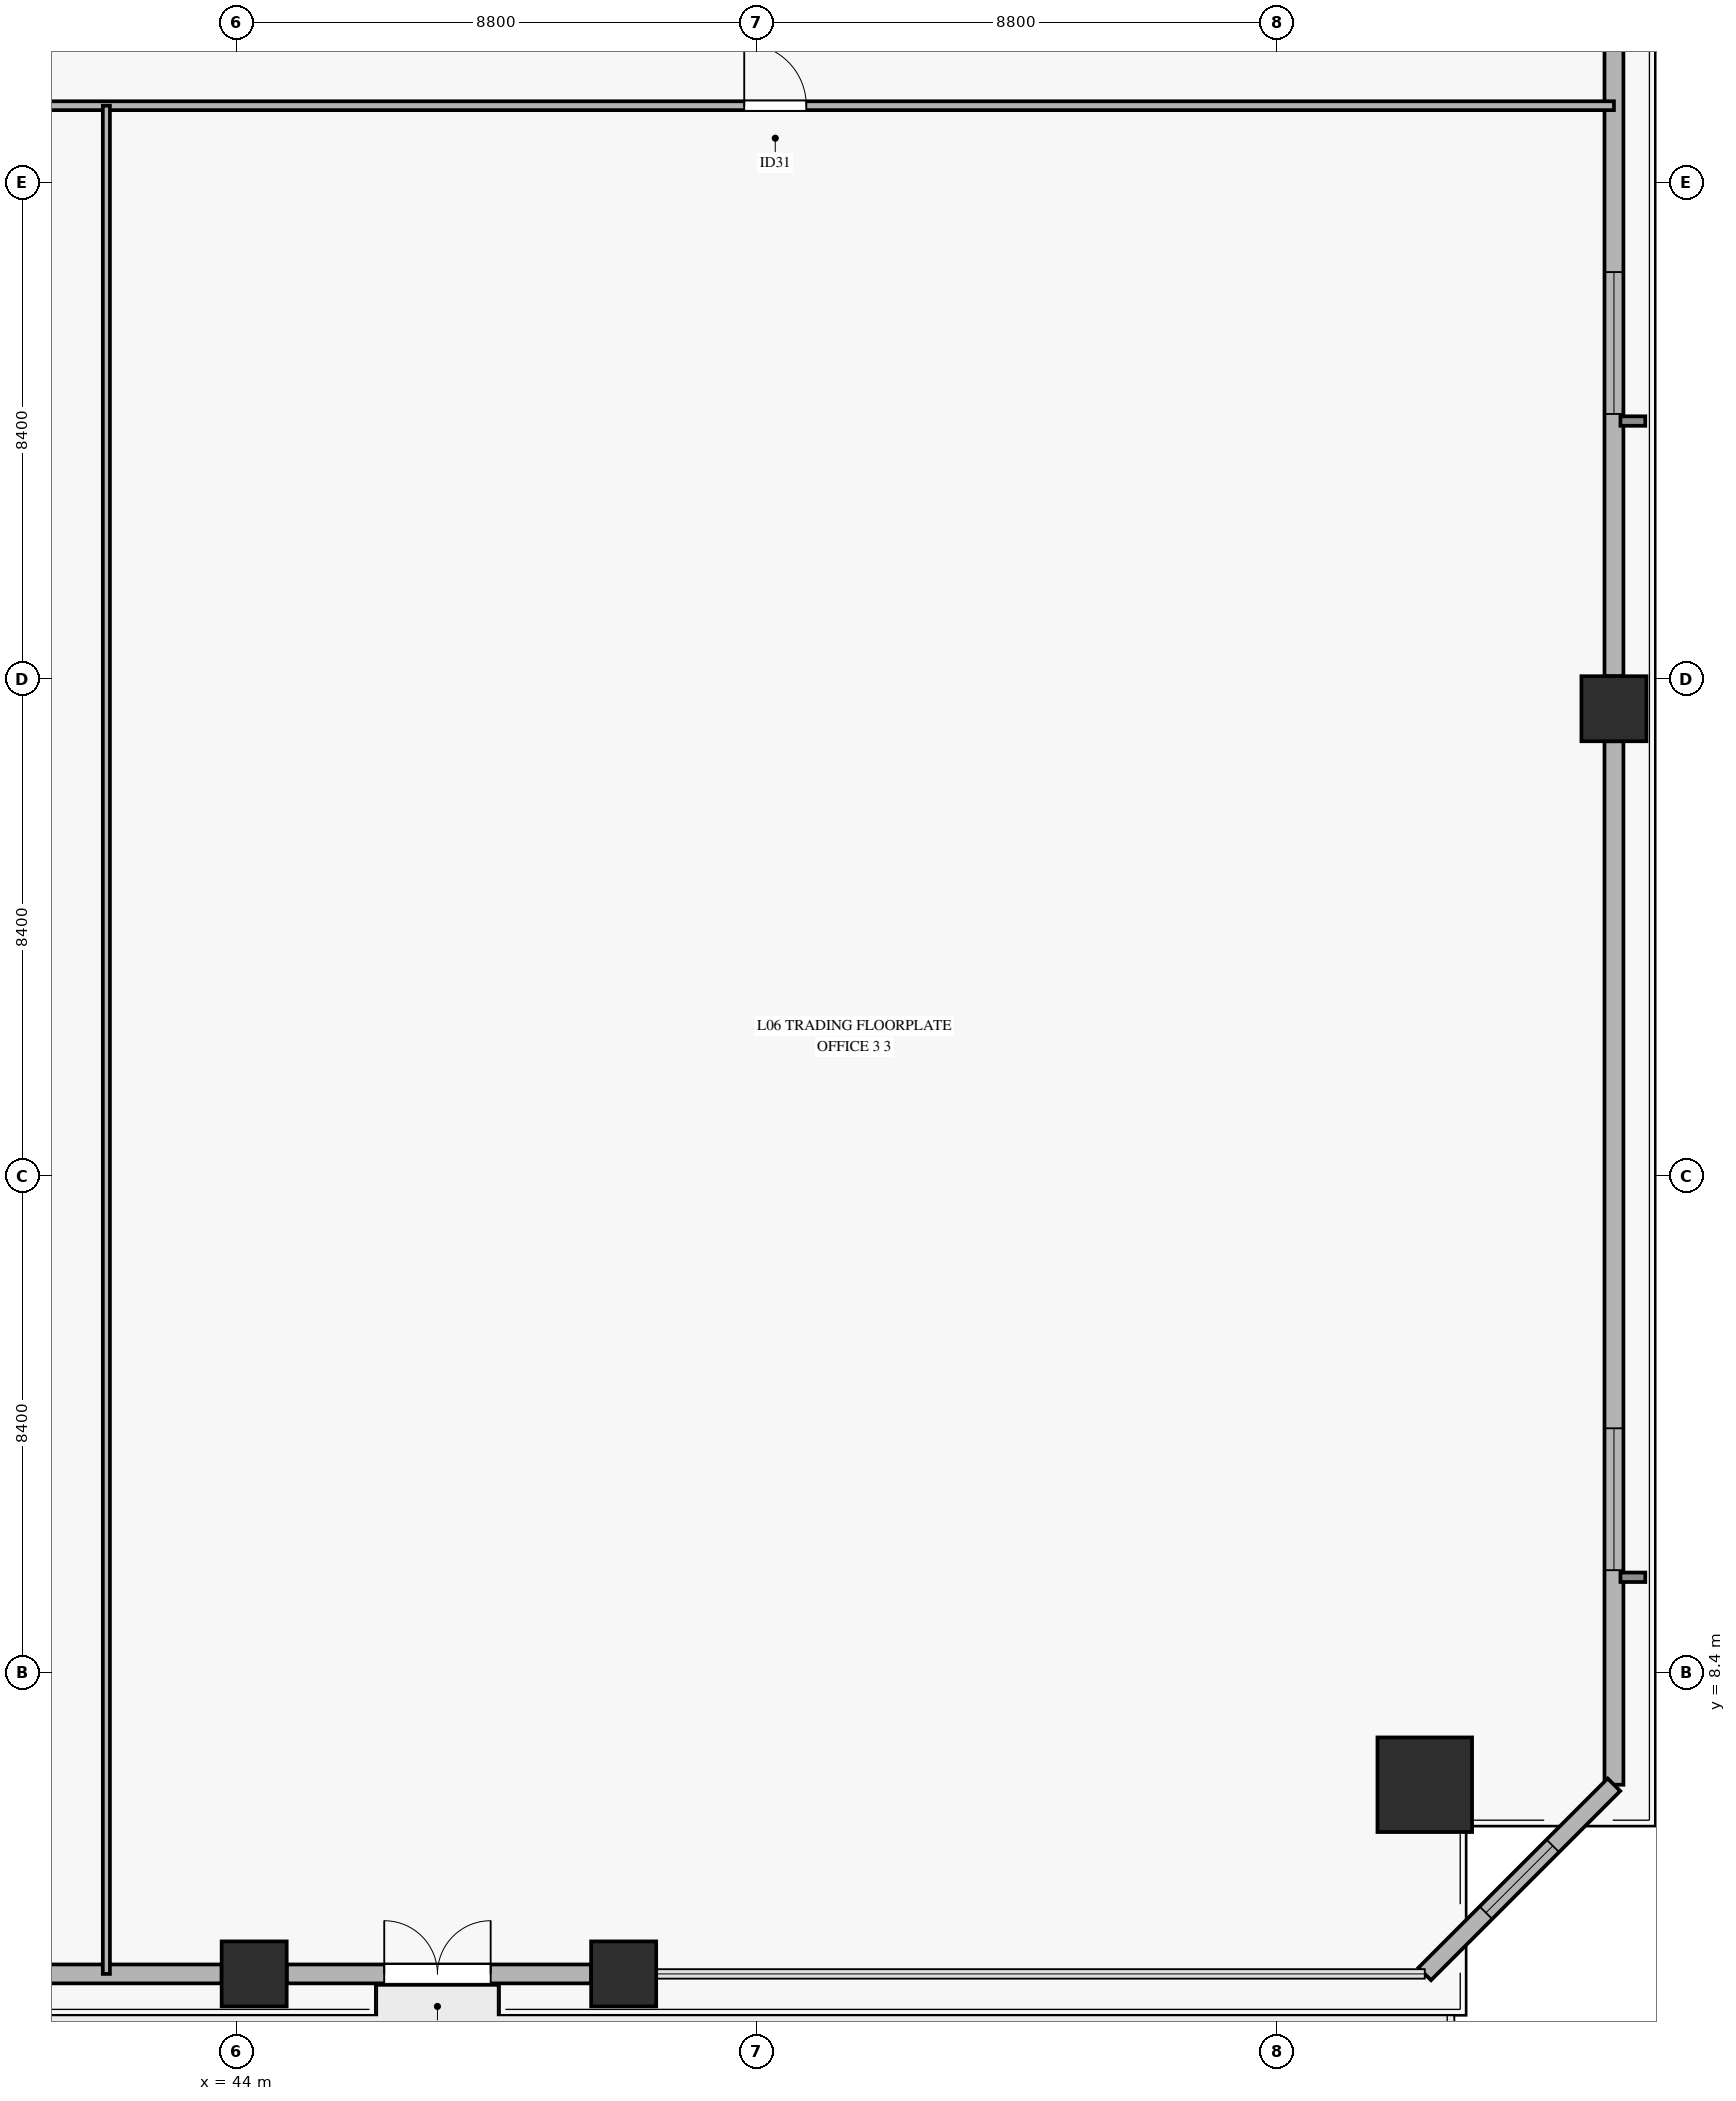
"""IFC4 building model, lengths in metres.
Left out: names, types, materials, properties, quantities, classifications, styles, units other than length and angle.
Written with IfcOpenShell. Run it as: python <this file> out.ifc"""

import sys

from ifc_helpers import new_model, si_unit, direction, frame, frame_2d, origin, origin_2d, place, context, subcontext, project, spatial, rectangle, hollow_rectangle, extrude, source, transform, mapped, element, fill, save


model = new_model("IFC4")
c1 = context("Model", 3, precision=1e-05, world=origin(), true_north=direction((0.0, 1.0)))
c2 = subcontext(c1, "Body", "Model", "MODEL_VIEW")
j1 = project(units=[si_unit("LENGTHUNIT", "METRE"), si_unit("PLANEANGLEUNIT", "RADIAN")], contexts=[c1])
p1 = place(None, origin())
s1 = spatial("IfcSite", under=j1, at=p1, CompositionType="ELEMENT")
p2 = place(p1, origin())
s2 = spatial("IfcBuilding", under=s1, at=p2, CompositionType="ELEMENT")
p3 = place(p2, frame((0.0, 0.0, 25.4)))
s3 = spatial("IfcBuildingStorey", under=s2, at=p3, CompositionType="ELEMENT", Elevation=25.4)
m1 = source(origin(), c2, "Body", "SweptSolid", [
    extrude(hollow_rectangle(XDim=1.6, YDim=1.6, WallThickness=0.075, at=origin_2d()), origin(), (0.0, 0.0, 1.0), 3.68),
])
p4 = place(p3, frame((64.1, 6.5, 0.0), z_axis=(0.0, 0.0, 1.0), x_axis=(1.0, 0.0, 0.0)))
e1 = element("IfcColumn", 1, at=p4, inside=s3, PredefinedType="COLUMN", context=c2, shape_type="MappedRepresentation", body=[
    mapped(m1, transform((0.0, 0.0, 0.0), x_axis=(1.0, 0.0, 0.0), y_axis=(0.0, 1.0, 0.0), z_axis=(0.0, 0.0, 1.0), scale=1.0)),
])
m2 = source(origin(), c2, "Body", "SweptSolid", [
    extrude(hollow_rectangle(XDim=1.1, YDim=1.1, WallThickness=0.05, at=origin_2d()), origin(), (0.0, 0.0, 1.0), 3.68),
])
for number, where, z_axis, x_axis in (
    (2, (44.3, 3.3, 0.0), (0.0, 0.0, 1.0), (1.0, 0.0, 0.0)),
    (3, (50.55, 3.3, 0.0), (0.0, 0.0, 1.0), (1.0, 0.0, 0.0)),
    (4, (67.3, 24.7, 0.0), (0.0, 0.0, 1.0), (1.0, 0.0, 0.0)),
):
    element("IfcColumn", number, at=place(p3, frame(where, z_axis=z_axis, x_axis=x_axis)), inside=s3, PredefinedType="COLUMN", context=c2, shape_type="MappedRepresentation", body=[
        mapped(m2, transform((0.0, 0.0, 0.0), x_axis=(1.0, 0.0, 0.0), y_axis=(0.0, 1.0, 0.0), z_axis=(0.0, 0.0, 1.0), scale=1.0)),
    ])
p5 = place(p3, frame((38.1, 3.3, 0.0), z_axis=(0.0, 0.0, 1.0), x_axis=(1.0, 0.0, 0.0)))
e5 = element("IfcWall", 5, at=p5, inside=s3, PredefinedType="SOLIDWALL", context=c2, shape_type="SweptSolid", body=[
    extrude(rectangle(XDim=5.65, YDim=0.32, at=frame_2d((2.825, 0.0))), origin(), (0.0, 0.0, 1.0), 3.16),
])
p6 = place(p3, frame((44.85, 3.3, 0.0), z_axis=(0.0, 0.0, 1.0), x_axis=(1.0, 0.0, 0.0)))
e6 = element("IfcWall", 6, at=p6, inside=s3, PredefinedType="SOLIDWALL", context=c2, shape_type="SweptSolid", body=[
    extrude(rectangle(XDim=5.15, YDim=0.32, at=frame_2d((2.575, 0.0))), origin(), (0.0, 0.0, 1.0), 3.16),
])
p7 = place(p6, frame((1.65, 0.0, 0.0)))
e7 = element("IfcOpeningElement", 7, at=p7, cuts=e6, PredefinedType="OPENING", context=c2, shape_type="SweptSolid", body=[
    extrude(rectangle(XDim=1.8, YDim=2.3, at=frame_2d((0.9, 1.15))), frame((0.0, 0.17, 0.0), z_axis=(0.0, -1.0, 0.0), x_axis=(1.0, 0.0, 0.0)), (0.0, 0.0, 1.0), 0.34),
])
p8 = place(p3, frame((67.3, 6.5, 0.0), z_axis=(0.0, 0.0, 1.0), x_axis=(0.0, 1.0, 0.0)))
e8 = element("IfcWall", 8, at=p8, inside=s3, PredefinedType="SOLIDWALL", context=c2, shape_type="SweptSolid", body=[
    extrude(rectangle(XDim=17.65, YDim=0.32, at=frame_2d((8.825, 0.0))), origin(), (0.0, 0.0, 1.0), 3.16),
])
p9 = place(p8, frame((3.629, 0.0, 0.45)))
e9 = element("IfcOpeningElement", 9, at=p9, cuts=e8, PredefinedType="OPENING", context=c2, shape_type="SweptSolid", body=[
    extrude(rectangle(XDim=2.4, YDim=2.1, at=frame_2d((1.2, 1.05))), frame((0.0, 0.17, 0.0), z_axis=(0.0, -1.0, 0.0), x_axis=(1.0, 0.0, 0.0)), (0.0, 0.0, 1.0), 0.34),
])
p10 = place(p3, frame((67.3, 25.25, 0.0), z_axis=(0.0, 0.0, 1.0), x_axis=(0.0, 1.0, 0.0)))
e10 = element("IfcWall", 10, at=p10, inside=s3, PredefinedType="SOLIDWALL", context=c2, shape_type="SweptSolid", body=[
    extrude(rectangle(XDim=17.65, YDim=0.32, at=frame_2d((8.825, 0.0))), origin(), (0.0, 0.0, 1.0), 3.16),
])
p11 = place(p10, frame((4.436, 0.0, 0.45)))
e11 = element("IfcOpeningElement", 11, at=p11, cuts=e10, PredefinedType="OPENING", context=c2, shape_type="SweptSolid", body=[
    extrude(rectangle(XDim=2.4, YDim=2.1, at=frame_2d((1.2, 1.05))), frame((0.0, 0.17, 0.0), z_axis=(0.0, -1.0, 0.0), x_axis=(1.0, 0.0, 0.0)), (0.0, 0.0, 1.0), 0.34),
])
p12 = place(p3, frame((64.1, 3.3, 0.0), z_axis=(0.0, 0.0, 1.0), x_axis=(0.707106781187, 0.707106781187, 0.0)))
e12 = element("IfcWall", 12, at=p12, inside=s3, PredefinedType="SOLIDWALL", context=c2, shape_type="SweptSolid", body=[
    extrude(rectangle(XDim=4.525, YDim=0.3, at=frame_2d((2.263, 0.0))), origin(), (0.0, 0.0, 1.0), 3.16),
])
p13 = place(p12, frame((1.463, 0.0, 0.45)))
e13 = element("IfcOpeningElement", 13, at=p13, cuts=e12, PredefinedType="OPENING", context=c2, shape_type="SweptSolid", body=[
    extrude(rectangle(XDim=1.6, YDim=2.0, at=frame_2d((0.8, 1.0))), frame((0.0, 0.16, 0.0), z_axis=(0.0, -1.0, 0.0), x_axis=(1.0, 0.0, 0.0)), (0.0, 0.0, 1.0), 0.32),
])
p14 = place(p3, frame((3.1, 34.9, 0.0), z_axis=(0.0, 0.0, 1.0), x_axis=(1.0, 0.0, 0.0)))
e14 = element("IfcWall", 14, at=p14, inside=s3, PredefinedType="PARTITIONING", context=c2, shape_type="SweptSolid", body=[
    extrude(rectangle(XDim=64.2, YDim=0.15, at=frame_2d((32.1, 0.0))), origin(), (0.0, 0.0, 1.0), 2.765),
])
p15 = place(p14, frame((11.409, 0.0, 0.0)))
e15 = element("IfcOpeningElement", 15, at=p15, cuts=e14, PredefinedType="OPENING", context=c2, shape_type="SweptSolid", body=[
    extrude(rectangle(XDim=1.05, YDim=2.15, at=frame_2d((0.525, 1.075))), frame((0.0, 0.085, 0.0), z_axis=(0.0, -1.0, 0.0), x_axis=(1.0, 0.0, 0.0)), (0.0, 0.0, 1.0), 0.17),
])
p16 = place(p14, frame((31.787, 0.0, 0.0)))
e16 = element("IfcOpeningElement", 16, at=p16, cuts=e14, PredefinedType="OPENING", context=c2, shape_type="SweptSolid", body=[
    extrude(rectangle(XDim=1.05, YDim=2.15, at=frame_2d((0.525, 1.075))), frame((0.0, 0.085, 0.0), z_axis=(0.0, -1.0, 0.0), x_axis=(1.0, 0.0, 0.0)), (0.0, 0.0, 1.0), 0.17),
])
p17 = place(p14, frame((49.489, 0.0, 0.0)))
e17 = element("IfcOpeningElement", 17, at=p17, cuts=e14, PredefinedType="OPENING", context=c2, shape_type="SweptSolid", body=[
    extrude(rectangle(XDim=1.05, YDim=2.15, at=frame_2d((0.525, 1.075))), frame((0.0, 0.085, 0.0), z_axis=(0.0, -1.0, 0.0), x_axis=(1.0, 0.0, 0.0)), (0.0, 0.0, 1.0), 0.17),
])
p18 = place(p3, frame((41.8, 3.3, 0.0), z_axis=(0.0, 0.0, 1.0), x_axis=(0.0, 1.0, 0.0)))
e18 = element("IfcWall", 18, at=p18, inside=s3, PredefinedType="PARTITIONING", context=c2, shape_type="SweptSolid", body=[
    extrude(rectangle(XDim=31.6, YDim=0.12, at=frame_2d((15.8, 0.0))), origin(), (0.0, 0.0, 1.0), 3.165),
])
m3 = source(origin(), c2, "Body", "SweptSolid", [
    extrude(rectangle(XDim=1.8, YDim=2.3, at=frame_2d((0.9, 1.15))), frame((0.0, 0.025, 0.0), z_axis=(0.0, -1.0, 0.0), x_axis=(1.0, 0.0, 0.0)), (0.0, 0.0, 1.0), 0.05),
])
p19 = place(p7, origin())
e19 = element("IfcDoor", 19, at=p19, inside=s3, OperationType="DOUBLE_SWING_RIGHT", PredefinedType="DOOR", context=c2, shape_type="MappedRepresentation", body=[
    mapped(m3, transform((0.0, 0.0, 0.0), x_axis=(1.0, 0.0, 0.0), y_axis=(0.0, 1.0, 0.0), z_axis=(0.0, 0.0, 1.0), scale=1.0)),
])
fill(e7, e19)
m4 = source(origin(), c2, "Body", "SweptSolid", [
    extrude(rectangle(XDim=2.4, YDim=2.1, at=frame_2d((1.2, 1.05))), frame((0.0, 0.03, 0.0), z_axis=(0.0, -1.0, 0.0), x_axis=(1.0, 0.0, 0.0)), (0.0, 0.0, 1.0), 0.06),
])
p20 = place(p9, origin())
e20 = element("IfcWindow", 20, at=p20, inside=s3, PartitioningType="SINGLE_PANEL", PredefinedType="WINDOW", context=c2, shape_type="MappedRepresentation", body=[
    mapped(m4, transform((0.0, 0.0, 0.0), x_axis=(1.0, 0.0, 0.0), y_axis=(0.0, 1.0, 0.0), z_axis=(0.0, 0.0, 1.0), scale=1.0)),
])
fill(e9, e20)
p21 = place(p11, origin())
e21 = element("IfcWindow", 21, at=p21, inside=s3, PartitioningType="SINGLE_PANEL", PredefinedType="WINDOW", context=c2, shape_type="MappedRepresentation", body=[
    mapped(m4, transform((0.0, 0.0, 0.0), x_axis=(1.0, 0.0, 0.0), y_axis=(0.0, 1.0, 0.0), z_axis=(0.0, 0.0, 1.0), scale=1.0)),
])
fill(e11, e21)
m5 = source(origin(), c2, "Body", "SweptSolid", [
    extrude(rectangle(XDim=1.6, YDim=2.0, at=frame_2d((0.8, 1.0))), frame((0.0, 0.03, 0.0), z_axis=(0.0, -1.0, 0.0), x_axis=(1.0, 0.0, 0.0)), (0.0, 0.0, 1.0), 0.06),
])
p22 = place(p13, origin())
e22 = element("IfcWindow", 22, at=p22, inside=s3, PartitioningType="SINGLE_PANEL", PredefinedType="WINDOW", context=c2, shape_type="MappedRepresentation", body=[
    mapped(m5, transform((0.0, 0.0, 0.0), x_axis=(1.0, 0.0, 0.0), y_axis=(0.0, 1.0, 0.0), z_axis=(0.0, 0.0, 1.0), scale=1.0)),
])
fill(e13, e22)
m6 = source(origin(), c2, "Body", "SweptSolid", [
    extrude(rectangle(XDim=1.05, YDim=2.15, at=frame_2d((0.525, 1.075))), frame((0.0, 0.025, 0.0), z_axis=(0.0, -1.0, 0.0), x_axis=(1.0, 0.0, 0.0)), (0.0, 0.0, 1.0), 0.05),
])
p23 = place(p17, origin())
e23 = element("IfcDoor", 23, at=p23, inside=s3, OperationType="SINGLE_SWING_LEFT", PredefinedType="DOOR", context=c2, shape_type="MappedRepresentation", body=[
    mapped(m6, transform((0.0, 0.0, 0.0), x_axis=(1.0, 0.0, 0.0), y_axis=(0.0, 1.0, 0.0), z_axis=(0.0, 0.0, 1.0), scale=1.0)),
])
fill(e17, e23)
save(model, sys.argv[1])
